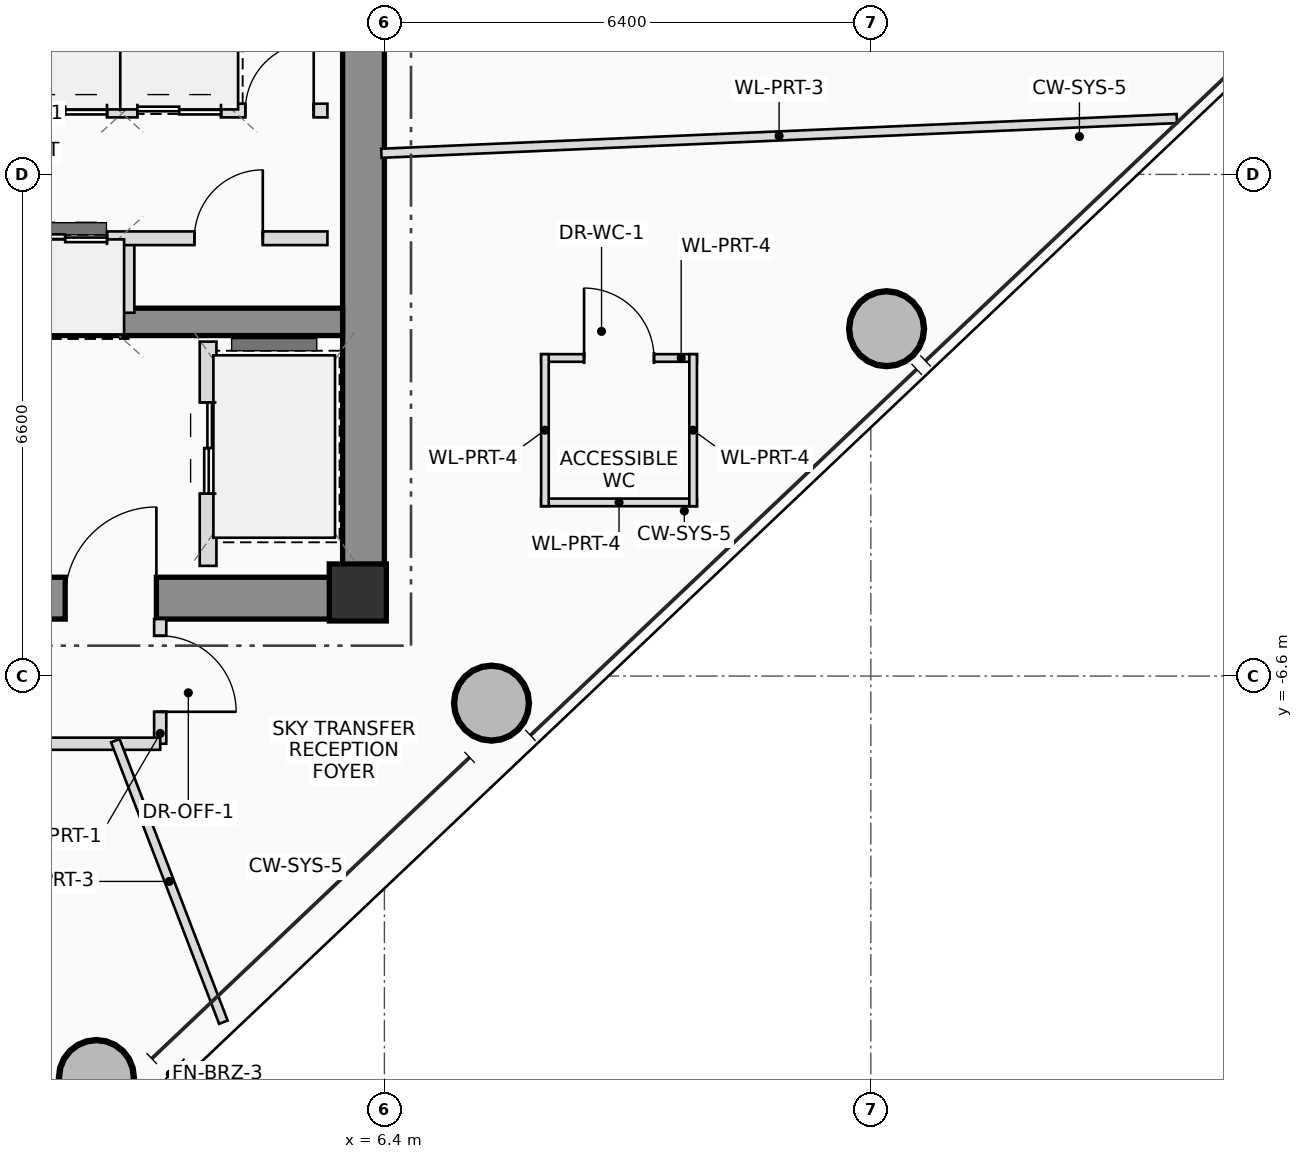
"""IFC4 building model, lengths in metres.
Left out: names, types, materials, properties, quantities, classifications, styles, units other than length and angle.
Written with IfcOpenShell. Run it as: python <this file> out.ifc"""

import sys

from ifc_helpers import new_model, si_unit, direction, frame, frame_2d, origin, origin_2d, place, context, subcontext, project, spatial, rectangle, hollow_circle, extrude, source, transform, mapped, element, fill, save


model = new_model("IFC4")
c1 = context("Model", 3, precision=1e-05, world=origin(), true_north=direction((0.0, 1.0)))
c2 = subcontext(c1, "Body", "Model", "MODEL_VIEW")
j1 = project(units=[si_unit("LENGTHUNIT", "METRE"), si_unit("PLANEANGLEUNIT", "RADIAN")], contexts=[c1])
p1 = place(None, origin())
s1 = spatial("IfcSite", under=j1, at=p1, CompositionType="ELEMENT")
p2 = place(p1, origin())
s2 = spatial("IfcBuilding", under=s1, at=p2, CompositionType="ELEMENT")
p3 = place(p2, frame((0.0, 0.0, 224.15)))
s3 = spatial("IfcBuildingStorey", under=s2, at=p3, CompositionType="ELEMENT", Elevation=224.15)
m1 = source(origin(), c2, "Body", "SweptSolid", [
    extrude(rectangle(XDim=0.75, YDim=0.75, at=origin_2d()), origin(), (0.0, 0.0, 1.0), 4.5),
])
p4 = place(p3, frame((6.05, -5.5, 0.0), z_axis=(0.0, 0.0, 1.0), x_axis=(1.0, 0.0, 0.0)))
e1 = element("IfcColumn", 1, at=p4, inside=s3, PredefinedType="COLUMN", context=c2, shape_type="MappedRepresentation", body=[
    mapped(m1, transform((0.0, 0.0, 0.0), scale=1.0)),
])
p5 = place(p3, frame((-6.4, -5.575, 0.0), z_axis=(0.0, 0.0, 1.0), x_axis=(1.0, 0.0, 0.0)))
e2 = element("IfcWall", 2, at=p5, inside=s3, PredefinedType="SHEAR", context=c2, shape_type="SweptSolid", body=[
    extrude(rectangle(XDim=12.8, YDim=0.55, at=frame_2d((6.4, 0.0))), origin(), (0.0, 0.0, 1.0), 4.5),
])
p6 = place(p5, frame((8.6, 0.0, 0.0)))
e3 = element("IfcOpeningElement", 3, at=p6, cuts=e2, PredefinedType="OPENING", context=c2, shape_type="SweptSolid", body=[
    extrude(rectangle(XDim=1.2, YDim=2.2, at=frame_2d((0.6, 1.1))), frame((0.0, 0.285, 0.0), z_axis=(0.0, -1.0, 0.0), x_axis=(1.0, 0.0, 0.0)), (0.0, 0.0, 1.0), 0.57),
])
p7 = place(p3, frame((6.125, -5.3, 0.0), z_axis=(0.0, 0.0, 1.0), x_axis=(0.0, 1.0, 0.0)))
e4 = element("IfcWall", 4, at=p7, inside=s3, PredefinedType="SHEAR", context=c2, shape_type="SweptSolid", body=[
    extrude(rectangle(XDim=10.6, YDim=0.55, at=frame_2d((5.3, 0.0))), origin(), (0.0, 0.0, 1.0), 4.5),
])
p8 = place(p3, frame((-5.85, -1.94, 0.0), z_axis=(0.0, 0.0, 1.0), x_axis=(1.0, 0.0, 0.0)))
e5 = element("IfcWall", 5, at=p8, inside=s3, PredefinedType="SHEAR", context=c2, shape_type="SweptSolid", body=[
    extrude(rectangle(XDim=11.7, YDim=0.36, at=frame_2d((5.85, 0.0))), origin(), (0.0, 0.0, 1.0), 4.5),
])
m2 = source(origin(), c2, "Body", "SweptSolid", [
    extrude(hollow_circle(Radius=0.5, WallThickness=0.04, at=origin_2d()), origin(), (0.0, 0.0, 1.0), 4.5),
])
for number, where, z_axis, x_axis in (
    (6, (2.611, -11.882, 0.0), (0.0, 0.0, 1.0), (1.0, 0.0, 0.0)),
    (7, (7.809, -6.956, 0.0), (0.0, 0.0, 1.0), (1.0, 0.0, 0.0)),
    (8, (13.007, -2.03, 0.0), (0.0, 0.0, 1.0), (1.0, 0.0, 0.0)),
):
    element("IfcColumn", number, at=place(p3, frame(where, z_axis=z_axis, x_axis=x_axis)), inside=s3, PredefinedType="COLUMN", context=c2, shape_type="MappedRepresentation", body=[
        mapped(m2, transform((0.0, 0.0, 0.0), scale=1.0)),
    ])
p9 = place(p3, frame((4.08, -5.15, 0.0), z_axis=(0.0, 0.0, 1.0), x_axis=(0.0, 1.0, 0.0)))
e9 = element("IfcWall", 9, at=p9, inside=s3, PredefinedType="PLUMBINGWALL", context=c2, shape_type="SweptSolid", body=[
    extrude(rectangle(XDim=2.95, YDim=0.22, at=frame_2d((1.475, 0.0))), origin(), (0.0, 0.0, 1.0), 4.3),
])
p10 = place(p9, frame((0.95, 0.0, 0.0)))
e10 = element("IfcOpeningElement", 10, at=p10, cuts=e9, PredefinedType="OPENING", context=c2, shape_type="SweptSolid", body=[
    extrude(rectangle(XDim=1.2, YDim=2.25, at=frame_2d((0.6, 1.125))), frame((0.0, 0.12, 0.0), z_axis=(0.0, -1.0, 0.0), x_axis=(1.0, 0.0, 0.0)), (0.0, 0.0, 1.0), 0.24),
])
for number, where, z_axis, x_axis in (
    (11, (3.02, 0.84, 0.0), (0.0, 0.0, 1.0), (0.0, 1.0, 0.0)),
    (12, (4.38, 0.84, 0.0), (0.0, 0.0, 1.0), (0.0, 1.0, 0.0)),
    (13, (3.02, -1.82, 0.0), (0.0, 0.0, 1.0), (0.0, 1.0, 0.0)),
):
    element("IfcWall", number, at=place(p3, frame(where, z_axis=z_axis, x_axis=x_axis)), inside=s3, PredefinedType="PLUMBINGWALL", context=c2, shape_type="SweptSolid", body=[
        extrude(rectangle(XDim=0.98, YDim=0.18, at=frame_2d((0.49, 0.0))), origin(), (0.0, 0.0, 1.0), 4.3),
    ])
p11 = place(p3, frame((-5.68, 0.84, 0.0), z_axis=(0.0, 0.0, 1.0), x_axis=(1.0, 0.0, 0.0)))
e14 = element("IfcWall", 14, at=p11, inside=s3, PredefinedType="PLUMBINGWALL", context=c2, shape_type="SweptSolid", body=[
    extrude(rectangle(XDim=11.33, YDim=0.18, at=frame_2d((5.665, 0.0))), origin(), (0.0, 0.0, 1.0), 4.3),
])
p12 = place(p11, frame((3.13, 0.0, 0.0)))
e15 = element("IfcOpeningElement", 15, at=p12, cuts=e14, PredefinedType="OPENING", context=c2, shape_type="SweptSolid", body=[
    extrude(rectangle(XDim=0.9, YDim=2.05, at=frame_2d((0.45, 1.025))), frame((0.0, 0.1, 0.0), z_axis=(0.0, -1.0, 0.0), x_axis=(1.0, 0.0, 0.0)), (0.0, 0.0, 1.0), 0.2),
])
p13 = place(p11, frame((7.33, 0.0, 0.0)))
e16 = element("IfcOpeningElement", 16, at=p13, cuts=e14, PredefinedType="OPENING", context=c2, shape_type="SweptSolid", body=[
    extrude(rectangle(XDim=1.1, YDim=2.2, at=frame_2d((0.55, 1.1))), frame((0.0, 0.1, 0.0), z_axis=(0.0, -1.0, 0.0), x_axis=(1.0, 0.0, 0.0)), (0.0, 0.0, 1.0), 0.2),
])
p14 = place(p11, frame((8.83, 0.0, 0.0)))
e17 = element("IfcOpeningElement", 17, at=p14, cuts=e14, PredefinedType="OPENING", context=c2, shape_type="SweptSolid", body=[
    extrude(rectangle(XDim=1.1, YDim=2.2, at=frame_2d((0.55, 1.1))), frame((0.0, 0.1, 0.0), z_axis=(0.0, -1.0, 0.0), x_axis=(1.0, 0.0, 0.0)), (0.0, 0.0, 1.0), 0.2),
])
p15 = place(p11, frame((10.25, 0.0, 0.0)))
e18 = element("IfcOpeningElement", 18, at=p15, cuts=e14, PredefinedType="OPENING", context=c2, shape_type="SweptSolid", body=[
    extrude(rectangle(XDim=0.9, YDim=2.05, at=frame_2d((0.45, 1.025))), frame((0.0, 0.1, 0.0), z_axis=(0.0, -1.0, 0.0), x_axis=(1.0, 0.0, 0.0)), (0.0, 0.0, 1.0), 0.2),
])
p16 = place(p3, frame((-5.68, -0.84, 0.0), z_axis=(0.0, 0.0, 1.0), x_axis=(1.0, 0.0, 0.0)))
e19 = element("IfcWall", 19, at=p16, inside=s3, PredefinedType="PLUMBINGWALL", context=c2, shape_type="SweptSolid", body=[
    extrude(rectangle(XDim=11.33, YDim=0.18, at=frame_2d((5.665, 0.0))), origin(), (0.0, 0.0, 1.0), 4.3),
])
p17 = place(p16, frame((3.13, 0.0, 0.0)))
e20 = element("IfcOpeningElement", 20, at=p17, cuts=e19, PredefinedType="OPENING", context=c2, shape_type="SweptSolid", body=[
    extrude(rectangle(XDim=0.9, YDim=2.05, at=frame_2d((0.45, 1.025))), frame((0.0, 0.1, 0.0), z_axis=(0.0, -1.0, 0.0), x_axis=(1.0, 0.0, 0.0)), (0.0, 0.0, 1.0), 0.2),
])
p18 = place(p16, frame((7.33, 0.0, 0.0)))
e21 = element("IfcOpeningElement", 21, at=p18, cuts=e19, PredefinedType="OPENING", context=c2, shape_type="SweptSolid", body=[
    extrude(rectangle(XDim=1.1, YDim=2.2, at=frame_2d((0.55, 1.1))), frame((0.0, 0.1, 0.0), z_axis=(0.0, -1.0, 0.0), x_axis=(1.0, 0.0, 0.0)), (0.0, 0.0, 1.0), 0.2),
])
p19 = place(p16, frame((9.58, 0.0, 0.0)))
e22 = element("IfcOpeningElement", 22, at=p19, cuts=e19, PredefinedType="OPENING", context=c2, shape_type="SweptSolid", body=[
    extrude(rectangle(XDim=0.9, YDim=2.05, at=frame_2d((0.45, 1.025))), frame((0.0, 0.1, 0.0), z_axis=(0.0, -1.0, 0.0), x_axis=(1.0, 0.0, 0.0)), (0.0, 0.0, 1.0), 0.2),
])
p20 = place(p3, frame((8.462, -2.415, 0.0), z_axis=(0.0, 0.0, 1.0), x_axis=(1.0, 0.0, 0.0)))
e23 = element("IfcWall", 23, at=p20, inside=s3, PredefinedType="PARTITIONING", context=c2, shape_type="SweptSolid", body=[
    extrude(rectangle(XDim=2.05, YDim=0.1, at=frame_2d((1.025, 0.0))), origin(), (0.0, 0.0, 1.0), 3.705),
])
p21 = place(p20, frame((0.565, 0.0, 0.0)))
e24 = element("IfcOpeningElement", 24, at=p21, cuts=e23, PredefinedType="OPENING", context=c2, shape_type="SweptSolid", body=[
    extrude(rectangle(XDim=0.92, YDim=2.1, at=frame_2d((0.46, 1.05))), frame((0.0, 0.06, 0.0), z_axis=(0.0, -1.0, 0.0), x_axis=(1.0, 0.0, 0.0)), (0.0, 0.0, 1.0), 0.12),
])
p22 = place(p3, frame((10.512, -4.315, 0.0), z_axis=(0.0, 0.0, 1.0), x_axis=(-1.0, 0.0, 0.0)))
e25 = element("IfcWall", 25, at=p22, inside=s3, PredefinedType="PARTITIONING", context=c2, shape_type="SweptSolid", body=[
    extrude(rectangle(XDim=2.05, YDim=0.1, at=frame_2d((1.025, 0.0))), origin(), (0.0, 0.0, 1.0), 3.705),
])
for number, where, z_axis, x_axis in (
    (26, (10.462, -2.365, 0.0), (0.0, 0.0, 1.0), (0.0, -1.0, 0.0)),
    (27, (8.512, -4.365, 0.0), (0.0, 0.0, 1.0), (0.0, 1.0, 0.0)),
):
    element("IfcWall", number, at=place(p3, frame(where, z_axis=z_axis, x_axis=x_axis)), inside=s3, PredefinedType="PARTITIONING", context=c2, shape_type="SweptSolid", body=[
        extrude(rectangle(XDim=2.0, YDim=0.1, at=frame_2d((1.0, 0.0))), origin(), (0.0, 0.0, 1.0), 3.705),
    ])
p23 = place(p3, frame((3.45, -5.85, 0.0), z_axis=(0.0, 0.0, 1.0), x_axis=(0.0, -1.0, 0.0)))
e28 = element("IfcWall", 28, at=p23, inside=s3, PredefinedType="PARTITIONING", context=c2, shape_type="SweptSolid", body=[
    extrude(rectangle(XDim=1.64, YDim=0.16, at=frame_2d((0.82, 0.0))), origin(), (0.0, 0.0, 1.0), 4.3),
])
p24 = place(p23, frame((0.22, 0.0, 0.0)))
e29 = element("IfcOpeningElement", 29, at=p24, cuts=e28, PredefinedType="OPENING", context=c2, shape_type="SweptSolid", body=[
    extrude(rectangle(XDim=1.0, YDim=2.25, at=frame_2d((0.5, 1.125))), frame((0.0, 0.09, 0.0), z_axis=(0.0, -1.0, 0.0), x_axis=(1.0, 0.0, 0.0)), (0.0, 0.0, 1.0), 0.18),
])
p25 = place(p3, frame((3.45, -7.49, 0.0), z_axis=(0.0, 0.0, 1.0), x_axis=(-1.0, 0.0, 0.0)))
e30 = element("IfcWall", 30, at=p25, inside=s3, PredefinedType="PARTITIONING", context=c2, shape_type="SweptSolid", body=[
    extrude(rectangle(XDim=9.81, YDim=0.16, at=frame_2d((4.905, 0.0))), origin(), (0.0, 0.0, 1.0), 3.705),
])
p26 = place(p25, frame((4.585, 0.0, 0.0)))
e31 = element("IfcOpeningElement", 31, at=p26, cuts=e30, PredefinedType="OPENING", context=c2, shape_type="SweptSolid", body=[
    extrude(rectangle(XDim=1.0, YDim=2.25, at=frame_2d((0.5, 1.125))), frame((0.0, 0.09, 0.0), z_axis=(0.0, -1.0, 0.0), x_axis=(1.0, 0.0, 0.0)), (0.0, 0.0, 1.0), 0.18),
])
p27 = place(p3, frame((6.36, 0.278, 0.0), z_axis=(0.0, 0.0, 1.0), x_axis=(0.999047873507, 0.043627358851, 0.0)))
e32 = element("IfcWall", 32, at=p27, inside=s3, PredefinedType="PARTITIONING", context=c2, shape_type="SweptSolid", body=[
    extrude(rectangle(XDim=10.476, YDim=0.12, at=frame_2d((5.238, 0.0))), origin(), (0.0, 0.0, 1.0), 3.705),
])
p28 = place(p3, frame((2.86, -7.45, 0.0), z_axis=(0.0, 0.0, 1.0), x_axis=(0.35834382605, -0.933589686282, 0.0)))
e33 = element("IfcWall", 33, at=p28, inside=s3, PredefinedType="PARTITIONING", context=c2, shape_type="SweptSolid", body=[
    extrude(rectangle(XDim=3.967, YDim=0.12, at=frame_2d((1.983, 0.0))), origin(), (0.0, 0.0, 1.0), 3.705),
])
p29 = place(p6, origin())
e34 = element("IfcDoor", 34, at=p29, inside=s3, OperationType="SINGLE_SWING_RIGHT", PredefinedType="DOOR", context=c2, shape_type="SweptSolid", body=[
    extrude(rectangle(XDim=1.2, YDim=2.2, at=frame_2d((0.6, 1.1))), frame((0.0, 0.025, 0.0), z_axis=(0.0, -1.0, 0.0), x_axis=(1.0, 0.0, 0.0)), (0.0, 0.0, 1.0), 0.05),
])
fill(e3, e34)
p30 = place(p10, origin())
e35 = element("IfcDoor", 35, at=p30, inside=s3, OperationType="DOUBLE_DOOR_SLIDING", PredefinedType="DOOR", context=c2, shape_type="SweptSolid", body=[
    extrude(rectangle(XDim=1.2, YDim=2.25, at=frame_2d((0.6, 1.125))), frame((0.0, 0.025, 0.0), z_axis=(0.0, -1.0, 0.0), x_axis=(1.0, 0.0, 0.0)), (0.0, 0.0, 1.0), 0.05),
])
fill(e10, e35)
p31 = place(p13, origin())
e36 = element("IfcDoor", 36, at=p31, inside=s3, OperationType="DOUBLE_DOOR_SLIDING", PredefinedType="DOOR", context=c2, shape_type="SweptSolid", body=[
    extrude(rectangle(XDim=1.1, YDim=2.2, at=frame_2d((0.55, 1.1))), frame((0.0, 0.025, 0.0), z_axis=(0.0, -1.0, 0.0), x_axis=(1.0, 0.0, 0.0)), (0.0, 0.0, 1.0), 0.05),
])
fill(e16, e36)
p32 = place(p14, origin())
e37 = element("IfcDoor", 37, at=p32, inside=s3, OperationType="DOUBLE_DOOR_SLIDING", PredefinedType="DOOR", context=c2, shape_type="SweptSolid", body=[
    extrude(rectangle(XDim=1.1, YDim=2.2, at=frame_2d((0.55, 1.1))), frame((0.0, 0.025, 0.0), z_axis=(0.0, -1.0, 0.0), x_axis=(1.0, 0.0, 0.0)), (0.0, 0.0, 1.0), 0.05),
])
fill(e17, e37)
p33 = place(p15, origin())
e38 = element("IfcDoor", 38, at=p33, inside=s3, OperationType="SINGLE_SWING_RIGHT", PredefinedType="DOOR", context=c2, shape_type="SweptSolid", body=[
    extrude(rectangle(XDim=0.9, YDim=2.05, at=frame_2d((0.45, 1.025))), frame((0.0, 0.025, 0.0), z_axis=(0.0, -1.0, 0.0), x_axis=(1.0, 0.0, 0.0)), (0.0, 0.0, 1.0), 0.05),
])
fill(e18, e38)
p34 = place(p18, origin())
e39 = element("IfcDoor", 39, at=p34, inside=s3, OperationType="DOUBLE_DOOR_SLIDING", PredefinedType="DOOR", context=c2, shape_type="SweptSolid", body=[
    extrude(rectangle(XDim=1.1, YDim=2.2, at=frame_2d((0.55, 1.1))), frame((0.0, 0.025, 0.0), z_axis=(0.0, -1.0, 0.0), x_axis=(1.0, 0.0, 0.0)), (0.0, 0.0, 1.0), 0.05),
])
fill(e21, e39)
p35 = place(p19, origin())
e40 = element("IfcDoor", 40, at=p35, inside=s3, OperationType="SINGLE_SWING_RIGHT", PredefinedType="DOOR", context=c2, shape_type="SweptSolid", body=[
    extrude(rectangle(XDim=0.9, YDim=2.05, at=frame_2d((0.45, 1.025))), frame((0.0, 0.025, 0.0), z_axis=(0.0, -1.0, 0.0), x_axis=(1.0, 0.0, 0.0)), (0.0, 0.0, 1.0), 0.05),
])
fill(e22, e40)
p36 = place(p21, origin())
e41 = element("IfcDoor", 41, at=p36, inside=s3, OperationType="SINGLE_SWING_LEFT", PredefinedType="DOOR", context=c2, shape_type="SweptSolid", body=[
    extrude(rectangle(XDim=0.92, YDim=2.1, at=frame_2d((0.46, 1.05))), frame((0.0, 0.025, 0.0), z_axis=(0.0, -1.0, 0.0), x_axis=(1.0, 0.0, 0.0)), (0.0, 0.0, 1.0), 0.05),
])
fill(e24, e41)
p37 = place(p24, origin())
e42 = element("IfcDoor", 42, at=p37, inside=s3, OperationType="SINGLE_SWING_RIGHT", PredefinedType="DOOR", context=c2, shape_type="SweptSolid", body=[
    extrude(rectangle(XDim=1.0, YDim=2.25, at=frame_2d((0.5, 1.125))), frame((0.0, 0.025, 0.0), z_axis=(0.0, -1.0, 0.0), x_axis=(1.0, 0.0, 0.0)), (0.0, 0.0, 1.0), 0.05),
])
fill(e29, e42)
save(model, sys.argv[1])
